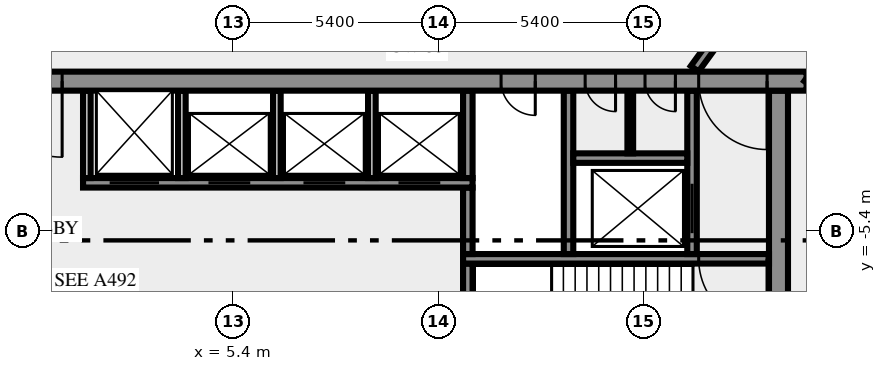
"""IFC4 building model, lengths in metres.
Left out: names, types, materials, properties, quantities, classifications, styles, units other than length and angle.
Written with IfcOpenShell. Run it as: python <this file> out.ifc"""

import sys

from ifc_helpers import new_model, si_unit, direction, frame, frame_2d, origin, place, context, subcontext, project, spatial, rectangle, extrude, element, fill, save


model = new_model("IFC4")
c1 = context("Model", 3, precision=1e-05, world=origin(), true_north=direction((0.0, 1.0)))
c2 = subcontext(c1, "Body", "Model", "MODEL_VIEW")
j1 = project(units=[si_unit("LENGTHUNIT", "METRE"), si_unit("PLANEANGLEUNIT", "RADIAN")], contexts=[c1])
p1 = place(None, origin())
s1 = spatial("IfcSite", under=j1, at=p1, CompositionType="ELEMENT")
p2 = place(p1, origin())
s2 = spatial("IfcBuilding", under=s1, at=p2, CompositionType="ELEMENT")
p3 = place(p2, frame((0.0, 0.0, 202.0)))
s3 = spatial("IfcBuildingStorey", under=s2, at=p3, CompositionType="ELEMENT", Elevation=202.0)
p4 = place(p3, frame((19.75, -10.5, 0.0), z_axis=(0.0, 0.0, 1.0), x_axis=(0.0, 1.0, 0.0)))
e1 = element("IfcWall", 1, at=p4, inside=s3, PredefinedType="SHEAR", context=c2, shape_type="SweptSolid", body=[
    extrude(rectangle(XDim=8.8, YDim=0.5, at=frame_2d((4.4, 0.0))), origin(), (0.0, 0.0, 1.0), 3.65),
])
p5 = place(p3, frame((11.575, -7.25, 0.0), z_axis=(0.0, 0.0, 1.0), x_axis=(0.0, 1.0, 0.0)))
e2 = element("IfcWall", 2, at=p5, inside=s3, PredefinedType="SHEAR", context=c2, shape_type="SweptSolid", body=[
    extrude(rectangle(XDim=1.0, YDim=0.25, at=frame_2d((0.5, 0.0))), origin(), (0.0, 0.0, 1.0), 3.65),
])
p6 = place(p3, frame((19.5, -6.125, 0.0), z_axis=(0.0, 0.0, 1.0), x_axis=(-1.0, 0.0, 0.0)))
e3 = element("IfcWall", 3, at=p6, inside=s3, PredefinedType="SHEAR", context=c2, shape_type="SweptSolid", body=[
    extrude(rectangle(XDim=8.05, YDim=0.25, at=frame_2d((4.025, 0.0))), origin(), (0.0, 0.0, 1.0), 3.65),
])
p7 = place(p6, frame((0.05, 0.0, 0.0)))
e4 = element("IfcOpeningElement", 4, at=p7, cuts=e3, PredefinedType="OPENING", context=c2, shape_type="SweptSolid", body=[
    extrude(rectangle(XDim=1.8, YDim=2.1, at=frame_2d((0.9, 1.05))), frame((0.0, 0.135, 0.0), z_axis=(0.0, -1.0, 0.0), x_axis=(1.0, 0.0, 0.0)), (0.0, 0.0, 1.0), 0.27),
])
p8 = place(p3, frame((11.575, -6.0, 0.0), z_axis=(0.0, 0.0, 1.0), x_axis=(0.0, 1.0, 0.0)))
e5 = element("IfcWall", 5, at=p8, inside=s3, PredefinedType="SHEAR", context=c2, shape_type="SweptSolid", body=[
    extrude(rectangle(XDim=1.75, YDim=0.25, at=frame_2d((0.875, 0.0))), origin(), (0.0, 0.0, 1.0), 3.65),
])
p9 = place(p3, frame((14.225, -6.0, 0.0), z_axis=(0.0, 0.0, 1.0), x_axis=(0.0, 1.0, 0.0)))
e6 = element("IfcWall", 6, at=p9, inside=s3, PredefinedType="SHEAR", context=c2, shape_type="SweptSolid", body=[
    extrude(rectangle(XDim=4.3, YDim=0.25, at=frame_2d((2.15, 0.0))), origin(), (0.0, 0.0, 1.0), 3.65),
])
p10 = place(p3, frame((17.475, -6.0, 0.0), z_axis=(0.0, 0.0, 1.0), x_axis=(0.0, 1.0, 0.0)))
e7 = element("IfcWall", 7, at=p10, inside=s3, PredefinedType="SHEAR", context=c2, shape_type="SweptSolid", body=[
    extrude(rectangle(XDim=4.3, YDim=0.25, at=frame_2d((2.15, 0.0))), origin(), (0.0, 0.0, 1.0), 3.65),
])
p11 = place(p10, frame((0.55, 0.0, 0.0)))
e8 = element("IfcOpeningElement", 8, at=p11, cuts=e7, PredefinedType="OPENING", context=c2, shape_type="SweptSolid", body=[
    extrude(rectangle(XDim=1.3, YDim=2.1, at=frame_2d((0.65, 1.05))), frame((0.0, 0.135, 0.0), z_axis=(0.0, -1.0, 0.0), x_axis=(1.0, 0.0, 0.0)), (0.0, 0.0, 1.0), 0.27),
])
p12 = place(p3, frame((1.45, -4.125, 0.0), z_axis=(0.0, 0.0, 1.0), x_axis=(1.0, 0.0, 0.0)))
e9 = element("IfcWall", 9, at=p12, inside=s3, PredefinedType="SHEAR", context=c2, shape_type="SweptSolid", body=[
    extrude(rectangle(XDim=10.25, YDim=0.25, at=frame_2d((5.125, 0.0))), origin(), (0.0, 0.0, 1.0), 3.65),
])
p13 = place(p12, frame((0.7, 0.0, 0.0)))
e10 = element("IfcOpeningElement", 10, at=p13, cuts=e9, PredefinedType="OPENING", context=c2, shape_type="SweptSolid", body=[
    extrude(rectangle(XDim=1.3, YDim=2.1, at=frame_2d((0.65, 1.05))), frame((0.0, 0.135, 0.0), z_axis=(0.0, -1.0, 0.0), x_axis=(1.0, 0.0, 0.0)), (0.0, 0.0, 1.0), 0.27),
])
p14 = place(p12, frame((3.3, 0.0, 0.0)))
e11 = element("IfcOpeningElement", 11, at=p14, cuts=e9, PredefinedType="OPENING", context=c2, shape_type="SweptSolid", body=[
    extrude(rectangle(XDim=1.1, YDim=2.1, at=frame_2d((0.55, 1.05))), frame((0.0, 0.135, 0.0), z_axis=(0.0, -1.0, 0.0), x_axis=(1.0, 0.0, 0.0)), (0.0, 0.0, 1.0), 0.27),
])
p15 = place(p12, frame((5.8, 0.0, 0.0)))
e12 = element("IfcOpeningElement", 12, at=p15, cuts=e9, PredefinedType="OPENING", context=c2, shape_type="SweptSolid", body=[
    extrude(rectangle(XDim=1.1, YDim=2.1, at=frame_2d((0.55, 1.05))), frame((0.0, 0.135, 0.0), z_axis=(0.0, -1.0, 0.0), x_axis=(1.0, 0.0, 0.0)), (0.0, 0.0, 1.0), 0.27),
])
p16 = place(p12, frame((8.3, 0.0, 0.0)))
e13 = element("IfcOpeningElement", 13, at=p16, cuts=e9, PredefinedType="OPENING", context=c2, shape_type="SweptSolid", body=[
    extrude(rectangle(XDim=1.1, YDim=2.1, at=frame_2d((0.55, 1.05))), frame((0.0, 0.135, 0.0), z_axis=(0.0, -1.0, 0.0), x_axis=(1.0, 0.0, 0.0)), (0.0, 0.0, 1.0), 0.27),
])
for number, where, z_axis, x_axis in (
    (14, (1.55, -4.0, 0.0), (0.0, 0.0, 1.0), (0.0, 1.0, 0.0)),
    (15, (4.05, -4.0, 0.0), (0.0, 0.0, 1.0), (0.0, 1.0, 0.0)),
    (16, (6.55, -4.0, 0.0), (0.0, 0.0, 1.0), (0.0, 1.0, 0.0)),
    (17, (9.05, -4.0, 0.0), (0.0, 0.0, 1.0), (0.0, 1.0, 0.0)),
):
    element("IfcWall", number, at=place(p3, frame(where, z_axis=z_axis, x_axis=x_axis)), inside=s3, PredefinedType="SOLIDWALL", context=c2, shape_type="SweptSolid", body=[
        extrude(rectangle(XDim=2.3, YDim=0.2, at=frame_2d((1.15, 0.0))), origin(), (0.0, 0.0, 1.0), 3.65),
    ])
p17 = place(p3, frame((11.575, -4.0, 0.0), z_axis=(0.0, 0.0, 1.0), x_axis=(0.0, 1.0, 0.0)))
e18 = element("IfcWall", 18, at=p17, inside=s3, PredefinedType="SHEAR", context=c2, shape_type="SweptSolid", body=[
    extrude(rectangle(XDim=2.3, YDim=0.25, at=frame_2d((1.15, 0.0))), origin(), (0.0, 0.0, 1.0), 3.65),
])
p18 = place(p3, frame((14.35, -3.475, 0.0), z_axis=(0.0, 0.0, 1.0), x_axis=(1.0, 0.0, 0.0)))
e19 = element("IfcWall", 19, at=p18, inside=s3, PredefinedType="SHEAR", context=c2, shape_type="SweptSolid", body=[
    extrude(rectangle(XDim=3.0, YDim=0.25, at=frame_2d((1.5, 0.0))), origin(), (0.0, 0.0, 1.0), 3.65),
])
p19 = place(p3, frame((15.85, -3.35, 0.0), z_axis=(0.0, 0.0, 1.0), x_axis=(0.0, 1.0, 0.0)))
e20 = element("IfcWall", 20, at=p19, inside=s3, PredefinedType="PARTITIONING", context=c2, shape_type="SweptSolid", body=[
    extrude(rectangle(XDim=1.65, YDim=0.15, at=frame_2d((0.825, 0.0))), origin(), (0.0, 0.0, 1.0), 3.65),
])
p20 = place(p3, frame((20.49, -1.45, 0.0), z_axis=(0.0, 0.0, 1.0), x_axis=(-1.0, 0.0, 0.0)))
e21 = element("IfcWall", 21, at=p20, inside=s3, PredefinedType="SHEAR", context=c2, shape_type="SweptSolid", body=[
    extrude(rectangle(XDim=40.98, YDim=0.5, at=frame_2d((20.49, 0.0))), origin(), (0.0, 0.0, 1.0), 3.65),
])
p21 = place(p20, frame((38.14, 0.0, 0.0)))
e22 = element("IfcOpeningElement", 22, at=p21, cuts=e21, PredefinedType="OPENING", context=c2, shape_type="SweptSolid", body=[
    extrude(rectangle(XDim=1.8, YDim=2.1, at=frame_2d((0.9, 1.05))), frame((0.0, 0.26, 0.0), z_axis=(0.0, -1.0, 0.0), x_axis=(1.0, 0.0, 0.0)), (0.0, 0.0, 1.0), 0.52),
])
p22 = place(p20, frame((35.89, 0.0, 0.0)))
e23 = element("IfcOpeningElement", 23, at=p22, cuts=e21, PredefinedType="OPENING", context=c2, shape_type="SweptSolid", body=[
    extrude(rectangle(XDim=0.9, YDim=2.1, at=frame_2d((0.45, 1.05))), frame((0.0, 0.26, 0.0), z_axis=(0.0, -1.0, 0.0), x_axis=(1.0, 0.0, 0.0)), (0.0, 0.0, 1.0), 0.52),
])
p23 = place(p20, frame((32.94, 0.0, 0.0)))
e24 = element("IfcOpeningElement", 24, at=p23, cuts=e21, PredefinedType="OPENING", context=c2, shape_type="SweptSolid", body=[
    extrude(rectangle(XDim=0.9, YDim=2.1, at=frame_2d((0.45, 1.05))), frame((0.0, 0.26, 0.0), z_axis=(0.0, -1.0, 0.0), x_axis=(1.0, 0.0, 0.0)), (0.0, 0.0, 1.0), 0.52),
])
p24 = place(p20, frame((30.302, 0.0, 0.0)))
e25 = element("IfcOpeningElement", 25, at=p24, cuts=e21, PredefinedType="OPENING", context=c2, shape_type="SweptSolid", body=[
    extrude(rectangle(XDim=0.9, YDim=2.1, at=frame_2d((0.45, 1.05))), frame((0.0, 0.26, 0.0), z_axis=(0.0, -1.0, 0.0), x_axis=(1.0, 0.0, 0.0)), (0.0, 0.0, 1.0), 0.52),
])
p25 = place(p20, frame((26.577, 0.0, 0.0)))
e26 = element("IfcOpeningElement", 26, at=p25, cuts=e21, PredefinedType="OPENING", context=c2, shape_type="SweptSolid", body=[
    extrude(rectangle(XDim=0.9, YDim=2.1, at=frame_2d((0.45, 1.05))), frame((0.0, 0.26, 0.0), z_axis=(0.0, -1.0, 0.0), x_axis=(1.0, 0.0, 0.0)), (0.0, 0.0, 1.0), 0.52),
])
p26 = place(p20, frame((19.59, 0.0, 0.0)))
e27 = element("IfcOpeningElement", 27, at=p26, cuts=e21, PredefinedType="OPENING", context=c2, shape_type="SweptSolid", body=[
    extrude(rectangle(XDim=2.0, YDim=2.1, at=frame_2d((1.0, 1.05))), frame((0.0, 0.26, 0.0), z_axis=(0.0, -1.0, 0.0), x_axis=(1.0, 0.0, 0.0)), (0.0, 0.0, 1.0), 0.52),
])
p27 = place(p20, frame((7.14, 0.0, 0.0)))
e28 = element("IfcOpeningElement", 28, at=p27, cuts=e21, PredefinedType="OPENING", context=c2, shape_type="SweptSolid", body=[
    extrude(rectangle(XDim=0.9, YDim=2.1, at=frame_2d((0.45, 1.05))), frame((0.0, 0.26, 0.0), z_axis=(0.0, -1.0, 0.0), x_axis=(1.0, 0.0, 0.0)), (0.0, 0.0, 1.0), 0.52),
])
p28 = place(p20, frame((5.028, 0.0, 0.0)))
e29 = element("IfcOpeningElement", 29, at=p28, cuts=e21, PredefinedType="OPENING", context=c2, shape_type="SweptSolid", body=[
    extrude(rectangle(XDim=0.8, YDim=2.1, at=frame_2d((0.4, 1.05))), frame((0.0, 0.26, 0.0), z_axis=(0.0, -1.0, 0.0), x_axis=(1.0, 0.0, 0.0)), (0.0, 0.0, 1.0), 0.52),
])
p29 = place(p20, frame((3.452, 0.0, 0.0)))
e30 = element("IfcOpeningElement", 30, at=p29, cuts=e21, PredefinedType="OPENING", context=c2, shape_type="SweptSolid", body=[
    extrude(rectangle(XDim=0.8, YDim=2.1, at=frame_2d((0.4, 1.05))), frame((0.0, 0.26, 0.0), z_axis=(0.0, -1.0, 0.0), x_axis=(1.0, 0.0, 0.0)), (0.0, 0.0, 1.0), 0.52),
])
p30 = place(p20, frame((1.04, 0.0, 0.0)))
e31 = element("IfcOpeningElement", 31, at=p30, cuts=e21, PredefinedType="OPENING", context=c2, shape_type="SweptSolid", body=[
    extrude(rectangle(XDim=1.8, YDim=2.1, at=frame_2d((0.9, 1.05))), frame((0.0, 0.26, 0.0), z_axis=(0.0, -1.0, 0.0), x_axis=(1.0, 0.0, 0.0)), (0.0, 0.0, 1.0), 0.52),
])
p31 = place(p3, frame((17.545, -1.125, 0.0), z_axis=(0.0, 0.0, 1.0), x_axis=(0.587796810203, 0.809008596935, 0.0)))
e32 = element("IfcWall", 32, at=p31, inside=s3, PredefinedType="SOLIDWALL", context=c2, shape_type="SweptSolid", body=[
    extrude(rectangle(XDim=12.703, YDim=0.25, at=frame_2d((6.352, 0.0))), origin(), (0.0, 0.0, 1.0), 3.65),
])
p32 = place(p31, frame((3.441, 0.0, 0.0)))
e33 = element("IfcOpeningElement", 33, at=p32, cuts=e32, PredefinedType="OPENING", context=c2, shape_type="SweptSolid", body=[
    extrude(rectangle(XDim=0.9, YDim=2.1, at=frame_2d((0.45, 1.05))), frame((0.0, 0.135, 0.0), z_axis=(0.0, -1.0, 0.0), x_axis=(1.0, 0.0, 0.0)), (0.0, 0.0, 1.0), 0.27),
])
p33 = place(p3, frame((27.009, 7.392, 0.0), z_axis=(0.0, 0.0, 1.0), x_axis=(-0.587776457057, -0.809023384414, 0.0)))
e34 = element("IfcWall", 34, at=p33, inside=s3, PredefinedType="SOLIDWALL", context=c2, shape_type="SweptSolid", body=[
    extrude(rectangle(XDim=11.021, YDim=0.25, at=frame_2d((5.51, 0.0))), origin(), (0.0, 0.0, 1.0), 3.65),
])
p34 = place(p33, frame((9.588, 0.0, 0.0)))
e35 = element("IfcOpeningElement", 35, at=p34, cuts=e34, PredefinedType="OPENING", context=c2, shape_type="SweptSolid", body=[
    extrude(rectangle(XDim=0.9, YDim=2.1, at=frame_2d((0.45, 1.05))), frame((0.0, 0.135, 0.0), z_axis=(0.0, -1.0, 0.0), x_axis=(1.0, 0.0, 0.0)), (0.0, 0.0, 1.0), 0.27),
])
p35 = place(p7, origin())
e36 = element("IfcDoor", 36, at=p35, inside=s3, OperationType="DOUBLE_DOOR_SINGLE_SWING", PredefinedType="DOOR", context=c2, shape_type="SweptSolid", body=[
    extrude(rectangle(XDim=1.8, YDim=2.1, at=frame_2d((0.9, 1.05))), frame((0.0, 0.025, 0.0), z_axis=(0.0, -1.0, 0.0), x_axis=(1.0, 0.0, 0.0)), (0.0, 0.0, 1.0), 0.05),
])
fill(e4, e36)
p36 = place(p11, origin())
e37 = element("IfcDoor", 37, at=p36, inside=s3, OperationType="DOUBLE_DOOR_SLIDING", PredefinedType="DOOR", context=c2, shape_type="SweptSolid", body=[
    extrude(rectangle(XDim=1.3, YDim=2.1, at=frame_2d((0.65, 1.05))), frame((0.0, 0.025, 0.0), z_axis=(0.0, -1.0, 0.0), x_axis=(1.0, 0.0, 0.0)), (0.0, 0.0, 1.0), 0.05),
])
fill(e8, e37)
p37 = place(p13, origin())
e38 = element("IfcDoor", 38, at=p37, inside=s3, OperationType="DOUBLE_DOOR_SLIDING", PredefinedType="DOOR", context=c2, shape_type="SweptSolid", body=[
    extrude(rectangle(XDim=1.3, YDim=2.1, at=frame_2d((0.65, 1.05))), frame((0.0, 0.025, 0.0), z_axis=(0.0, -1.0, 0.0), x_axis=(1.0, 0.0, 0.0)), (0.0, 0.0, 1.0), 0.05),
])
fill(e10, e38)
p38 = place(p14, origin())
e39 = element("IfcDoor", 39, at=p38, inside=s3, OperationType="DOUBLE_DOOR_SLIDING", PredefinedType="DOOR", context=c2, shape_type="SweptSolid", body=[
    extrude(rectangle(XDim=1.1, YDim=2.1, at=frame_2d((0.55, 1.05))), frame((0.0, 0.025, 0.0), z_axis=(0.0, -1.0, 0.0), x_axis=(1.0, 0.0, 0.0)), (0.0, 0.0, 1.0), 0.05),
])
fill(e11, e39)
p39 = place(p15, origin())
e40 = element("IfcDoor", 40, at=p39, inside=s3, OperationType="DOUBLE_DOOR_SLIDING", PredefinedType="DOOR", context=c2, shape_type="SweptSolid", body=[
    extrude(rectangle(XDim=1.1, YDim=2.1, at=frame_2d((0.55, 1.05))), frame((0.0, 0.025, 0.0), z_axis=(0.0, -1.0, 0.0), x_axis=(1.0, 0.0, 0.0)), (0.0, 0.0, 1.0), 0.05),
])
fill(e12, e40)
p40 = place(p16, origin())
e41 = element("IfcDoor", 41, at=p40, inside=s3, OperationType="DOUBLE_DOOR_SLIDING", PredefinedType="DOOR", context=c2, shape_type="SweptSolid", body=[
    extrude(rectangle(XDim=1.1, YDim=2.1, at=frame_2d((0.55, 1.05))), frame((0.0, 0.025, 0.0), z_axis=(0.0, -1.0, 0.0), x_axis=(1.0, 0.0, 0.0)), (0.0, 0.0, 1.0), 0.05),
])
fill(e13, e41)
p41 = place(p26, origin())
e42 = element("IfcDoor", 42, at=p41, inside=s3, OperationType="DOUBLE_DOOR_SINGLE_SWING", PredefinedType="DOOR", context=c2, shape_type="SweptSolid", body=[
    extrude(rectangle(XDim=2.0, YDim=2.1, at=frame_2d((1.0, 1.05))), frame((0.0, 0.025, 0.0), z_axis=(0.0, -1.0, 0.0), x_axis=(1.0, 0.0, 0.0)), (0.0, 0.0, 1.0), 0.05),
])
fill(e27, e42)
p42 = place(p27, origin())
e43 = element("IfcDoor", 43, at=p42, inside=s3, OperationType="SINGLE_SWING_LEFT", PredefinedType="DOOR", context=c2, shape_type="SweptSolid", body=[
    extrude(rectangle(XDim=0.9, YDim=2.1, at=frame_2d((0.45, 1.05))), frame((0.0, 0.025, 0.0), z_axis=(0.0, -1.0, 0.0), x_axis=(1.0, 0.0, 0.0)), (0.0, 0.0, 1.0), 0.05),
])
fill(e28, e43)
p43 = place(p28, origin())
e44 = element("IfcDoor", 44, at=p43, inside=s3, OperationType="SINGLE_SWING_LEFT", PredefinedType="DOOR", context=c2, shape_type="SweptSolid", body=[
    extrude(rectangle(XDim=0.8, YDim=2.1, at=frame_2d((0.4, 1.05))), frame((0.0, 0.025, 0.0), z_axis=(0.0, -1.0, 0.0), x_axis=(1.0, 0.0, 0.0)), (0.0, 0.0, 1.0), 0.05),
])
fill(e29, e44)
p44 = place(p29, origin())
e45 = element("IfcDoor", 45, at=p44, inside=s3, OperationType="SINGLE_SWING_LEFT", PredefinedType="DOOR", context=c2, shape_type="SweptSolid", body=[
    extrude(rectangle(XDim=0.8, YDim=2.1, at=frame_2d((0.4, 1.05))), frame((0.0, 0.025, 0.0), z_axis=(0.0, -1.0, 0.0), x_axis=(1.0, 0.0, 0.0)), (0.0, 0.0, 1.0), 0.05),
])
fill(e30, e45)
p45 = place(p30, origin())
e46 = element("IfcDoor", 46, at=p45, inside=s3, OperationType="DOUBLE_DOOR_SINGLE_SWING", PredefinedType="DOOR", context=c2, shape_type="SweptSolid", body=[
    extrude(rectangle(XDim=1.8, YDim=2.1, at=frame_2d((0.9, 1.05))), frame((0.0, 0.025, 0.0), z_axis=(0.0, -1.0, 0.0), x_axis=(1.0, 0.0, 0.0)), (0.0, 0.0, 1.0), 0.05),
])
fill(e31, e46)
save(model, sys.argv[1])
